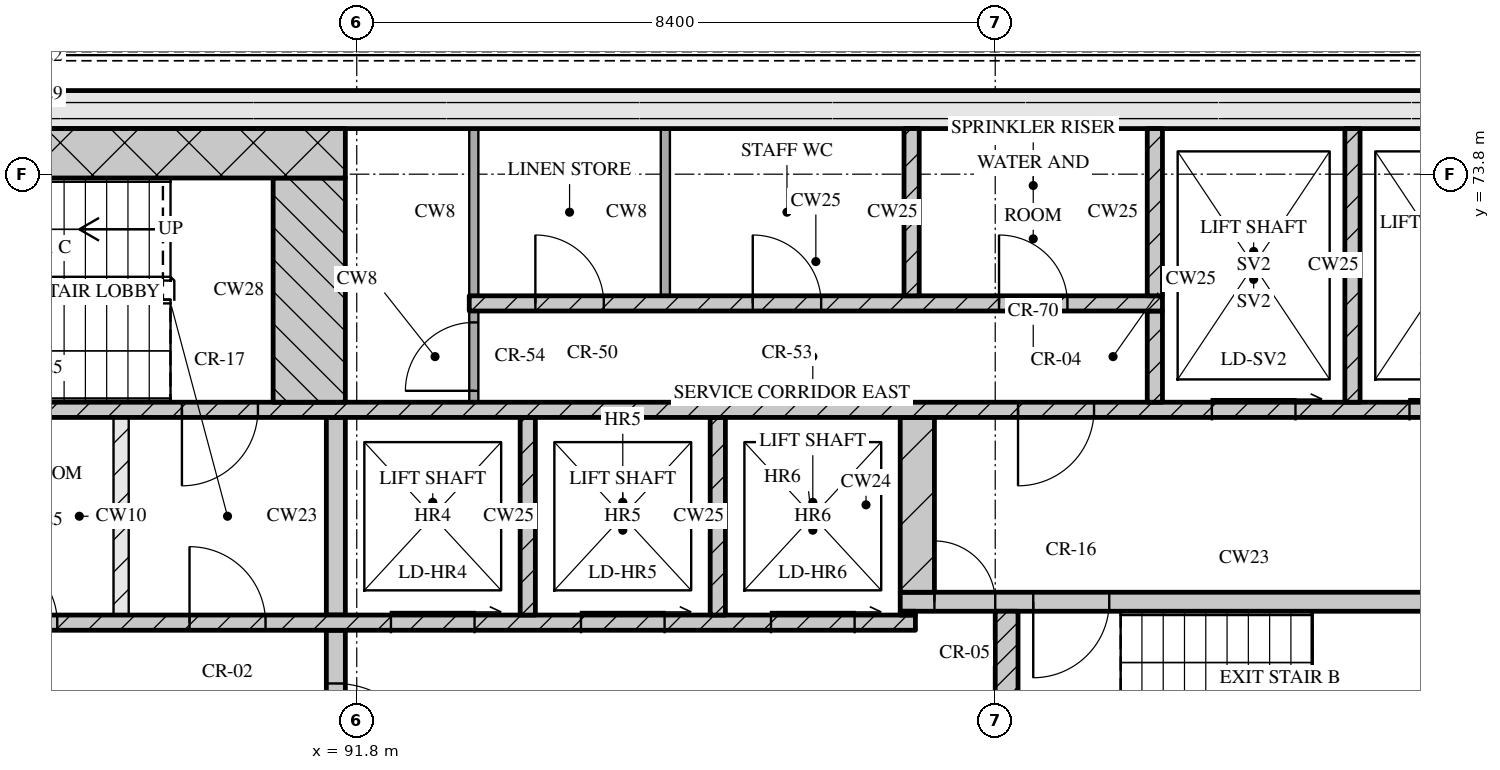
"""IFC4 building model, lengths in metres.
Left out: names, types, materials, properties, quantities, classifications, styles, units other than length and angle.
Written with IfcOpenShell. Run it as: python <this file> out.ifc"""

import sys

from ifc_helpers import new_model, si_unit, direction, frame, frame_2d, origin, place, context, subcontext, project, spatial, rectangle, extrude, element, fill, save


model = new_model("IFC4")
c1 = context("Model", 3, precision=1e-05, world=origin(), true_north=direction((0.0, 1.0)))
c2 = subcontext(c1, "Body", "Model", "MODEL_VIEW")
j1 = project(units=[si_unit("LENGTHUNIT", "METRE"), si_unit("PLANEANGLEUNIT", "RADIAN")], contexts=[c1])
p1 = place(None, origin())
s1 = spatial("IfcSite", under=j1, at=p1, CompositionType="ELEMENT")
p2 = place(p1, origin())
s2 = spatial("IfcBuilding", under=s1, at=p2, CompositionType="ELEMENT")
p3 = place(p2, frame((0.0, 0.0, 306.75)))
s3 = spatial("IfcBuildingStorey", under=s2, at=p3, CompositionType="ELEMENT", Elevation=306.75)
p4 = place(p3, frame((67.3, 74.65, 0.0), z_axis=(0.0, 0.0, 1.0), x_axis=(1.0, 0.0, 0.0)))
e1 = element("IfcWall", 1, at=p4, inside=s3, PredefinedType="SOLIDWALL", context=c2, shape_type="SweptSolid", body=[
    extrude(rectangle(XDim=40.6, YDim=0.5, at=frame_2d((20.3, 0.0))), origin(), (0.0, 0.0, 1.0), 3.3),
])
p5 = place(p3, frame((91.525, 65.2, 0.0), z_axis=(0.0, 0.0, 1.0), x_axis=(0.0, 1.0, 0.0)))
e2 = element("IfcWall", 2, at=p5, inside=s3, PredefinedType="SOLIDWALL", context=c2, shape_type="SweptSolid", body=[
    extrude(rectangle(XDim=2.6, YDim=0.25, at=frame_2d((1.3, 0.0))), origin(), (0.0, 0.0, 1.0), 3.3),
])
p6 = place(p5, frame((0.7, 0.0, 0.0)))
e3 = element("IfcOpeningElement", 3, at=p6, cuts=e2, PredefinedType="OPENING", context=c2, shape_type="SweptSolid", body=[
    extrude(rectangle(XDim=1.2, YDim=2.1, at=frame_2d((0.6, 1.05))), frame((0.0, 0.135, 0.0), z_axis=(0.0, -1.0, 0.0), x_axis=(1.0, 0.0, 0.0)), (0.0, 0.0, 1.0), 0.27),
])
p7 = place(p3, frame((100.35, 65.2, 0.0), z_axis=(0.0, 0.0, 1.0), x_axis=(0.0, 1.0, 0.0)))
e4 = element("IfcWall", 4, at=p7, inside=s3, PredefinedType="SOLIDWALL", context=c2, shape_type="SweptSolid", body=[
    extrude(rectangle(XDim=2.85, YDim=0.3, at=frame_2d((1.425, 0.0))), origin(), (0.0, 0.0, 1.0), 3.3),
])
p8 = place(p3, frame((76.05, 67.9, 0.0), z_axis=(0.0, 0.0, 1.0), x_axis=(1.0, 0.0, 0.0)))
e5 = element("IfcWall", 5, at=p8, inside=s3, PredefinedType="SOLIDWALL", context=c2, shape_type="SweptSolid", body=[
    extrude(rectangle(XDim=23.1, YDim=0.2, at=frame_2d((11.55, 0.0))), origin(), (0.0, 0.0, 1.0), 3.3),
])
p9 = place(p8, frame((1.4, 0.0, 0.0)))
e6 = element("IfcOpeningElement", 6, at=p9, cuts=e5, PredefinedType="OPENING", context=c2, shape_type="SweptSolid", body=[
    extrude(rectangle(XDim=0.9, YDim=2.1, at=frame_2d((0.45, 1.05))), frame((0.0, 0.11, 0.0), z_axis=(0.0, -1.0, 0.0), x_axis=(1.0, 0.0, 0.0)), (0.0, 0.0, 1.0), 0.22),
])
p10 = place(p8, frame((5.11, 0.0, 0.0)))
e7 = element("IfcOpeningElement", 7, at=p10, cuts=e5, PredefinedType="OPENING", context=c2, shape_type="SweptSolid", body=[
    extrude(rectangle(XDim=0.9, YDim=2.1, at=frame_2d((0.45, 1.05))), frame((0.0, 0.11, 0.0), z_axis=(0.0, -1.0, 0.0), x_axis=(1.0, 0.0, 0.0)), (0.0, 0.0, 1.0), 0.22),
])
p11 = place(p8, frame((8.45, 0.0, 0.0)))
e8 = element("IfcOpeningElement", 8, at=p11, cuts=e5, PredefinedType="OPENING", context=c2, shape_type="SweptSolid", body=[
    extrude(rectangle(XDim=0.9, YDim=2.1, at=frame_2d((0.45, 1.05))), frame((0.0, 0.11, 0.0), z_axis=(0.0, -1.0, 0.0), x_axis=(1.0, 0.0, 0.0)), (0.0, 0.0, 1.0), 0.22),
])
p12 = place(p8, frame((10.91, 0.0, 0.0)))
e9 = element("IfcOpeningElement", 9, at=p12, cuts=e5, PredefinedType="OPENING", context=c2, shape_type="SweptSolid", body=[
    extrude(rectangle(XDim=0.9, YDim=2.1, at=frame_2d((0.45, 1.05))), frame((0.0, 0.11, 0.0), z_axis=(0.0, -1.0, 0.0), x_axis=(1.0, 0.0, 0.0)), (0.0, 0.0, 1.0), 0.22),
])
p13 = place(p8, frame((13.55, 0.0, 0.0)))
e10 = element("IfcOpeningElement", 10, at=p13, cuts=e5, PredefinedType="OPENING", context=c2, shape_type="SweptSolid", body=[
    extrude(rectangle(XDim=1.0, YDim=2.1, at=frame_2d((0.5, 1.05))), frame((0.0, 0.11, 0.0), z_axis=(0.0, -1.0, 0.0), x_axis=(1.0, 0.0, 0.0)), (0.0, 0.0, 1.0), 0.22),
])
p14 = place(p8, frame((16.2, 0.0, 0.0)))
e11 = element("IfcOpeningElement", 11, at=p14, cuts=e5, PredefinedType="OPENING", context=c2, shape_type="SweptSolid", body=[
    extrude(rectangle(XDim=1.1, YDim=2.1, at=frame_2d((0.55, 1.05))), frame((0.0, 0.11, 0.0), z_axis=(0.0, -1.0, 0.0), x_axis=(1.0, 0.0, 0.0)), (0.0, 0.0, 1.0), 0.22),
])
p15 = place(p8, frame((18.7, 0.0, 0.0)))
e12 = element("IfcOpeningElement", 12, at=p15, cuts=e5, PredefinedType="OPENING", context=c2, shape_type="SweptSolid", body=[
    extrude(rectangle(XDim=1.1, YDim=2.1, at=frame_2d((0.55, 1.05))), frame((0.0, 0.11, 0.0), z_axis=(0.0, -1.0, 0.0), x_axis=(1.0, 0.0, 0.0)), (0.0, 0.0, 1.0), 0.22),
])
p16 = place(p8, frame((21.2, 0.0, 0.0)))
e13 = element("IfcOpeningElement", 13, at=p16, cuts=e5, PredefinedType="OPENING", context=c2, shape_type="SweptSolid", body=[
    extrude(rectangle(XDim=1.1, YDim=2.1, at=frame_2d((0.55, 1.05))), frame((0.0, 0.11, 0.0), z_axis=(0.0, -1.0, 0.0), x_axis=(1.0, 0.0, 0.0)), (0.0, 0.0, 1.0), 0.22),
])
p17 = place(p3, frame((88.7, 68.0, 0.0), z_axis=(0.0, 0.0, 1.0), x_axis=(0.0, 1.0, 0.0)))
e14 = element("IfcWall", 14, at=p17, inside=s3, PredefinedType="PARTITIONING", context=c2, shape_type="SweptSolid", body=[
    extrude(rectangle(XDim=2.6, YDim=0.2, at=frame_2d((1.3, 0.0))), origin(), (0.0, 0.0, 1.0), 3.3),
])
p18 = place(p3, frame((91.525, 68.0, 0.0), z_axis=(0.0, 0.0, 1.0), x_axis=(0.0, 1.0, 0.0)))
e15 = element("IfcWall", 15, at=p18, inside=s3, PredefinedType="SOLIDWALL", context=c2, shape_type="SweptSolid", body=[
    extrude(rectangle(XDim=2.6, YDim=0.25, at=frame_2d((1.3, 0.0))), origin(), (0.0, 0.0, 1.0), 3.3),
])
for number, where, z_axis, x_axis in (
    (16, (94.05, 68.0, 0.0), (0.0, 0.0, 1.0), (0.0, 1.0, 0.0)),
    (17, (96.55, 68.0, 0.0), (0.0, 0.0, 1.0), (0.0, 1.0, 0.0)),
):
    element("IfcWall", number, at=place(p3, frame(where, z_axis=z_axis, x_axis=x_axis)), inside=s3, PredefinedType="SOLIDWALL", context=c2, shape_type="SweptSolid", body=[
        extrude(rectangle(XDim=2.6, YDim=0.2, at=frame_2d((1.3, 0.0))), origin(), (0.0, 0.0, 1.0), 3.3),
    ])
p19 = place(p3, frame((98.95, 68.025, 0.0), z_axis=(0.0, 0.0, 1.0), x_axis=(1.0, 0.0, 0.0)))
e18 = element("IfcWall", 18, at=p19, inside=s3, PredefinedType="SOLIDWALL", context=c2, shape_type="SweptSolid", body=[
    extrude(rectangle(XDim=0.2, YDim=0.05, at=frame_2d((0.1, 0.0))), origin(), (0.0, 0.0, 1.0), 3.3),
])
p20 = place(p3, frame((98.95, 68.175, 0.0), z_axis=(0.0, 0.0, 1.0), x_axis=(1.0, 0.0, 0.0)))
e19 = element("IfcWall", 19, at=p20, inside=s3, PredefinedType="SOLIDWALL", context=c2, shape_type="SweptSolid", body=[
    extrude(rectangle(XDim=8.45, YDim=0.25, at=frame_2d((4.225, 0.0))), origin(), (0.0, 0.0, 1.0), 3.3),
])
p21 = place(p20, frame((0.45, 0.0, 0.0)))
e20 = element("IfcOpeningElement", 20, at=p21, cuts=e19, PredefinedType="OPENING", context=c2, shape_type="SweptSolid", body=[
    extrude(rectangle(XDim=0.8, YDim=2.1, at=frame_2d((0.4, 1.05))), frame((0.0, 0.135, 0.0), z_axis=(0.0, -1.0, 0.0), x_axis=(1.0, 0.0, 0.0)), (0.0, 0.0, 1.0), 0.27),
])
p22 = place(p20, frame((1.75, 0.0, 0.0)))
e21 = element("IfcOpeningElement", 21, at=p22, cuts=e19, PredefinedType="OPENING", context=c2, shape_type="SweptSolid", body=[
    extrude(rectangle(XDim=1.0, YDim=2.1, at=frame_2d((0.5, 1.05))), frame((0.0, 0.135, 0.0), z_axis=(0.0, -1.0, 0.0), x_axis=(1.0, 0.0, 0.0)), (0.0, 0.0, 1.0), 0.27),
])
p23 = place(p3, frame((99.175, 68.3, 0.0), z_axis=(0.0, 0.0, 1.0), x_axis=(0.0, 1.0, 0.0)))
e22 = element("IfcWall", 22, at=p23, inside=s3, PredefinedType="SOLIDWALL", context=c2, shape_type="SweptSolid", body=[
    extrude(rectangle(XDim=2.3, YDim=0.45, at=frame_2d((1.15, 0.0))), origin(), (0.0, 0.0, 1.0), 3.3),
])
p24 = place(p3, frame((67.8, 70.7, 0.0), z_axis=(0.0, 0.0, 1.0), x_axis=(1.0, 0.0, 0.0)))
e23 = element("IfcWall", 23, at=p24, inside=s3, PredefinedType="SOLIDWALL", context=c2, shape_type="SweptSolid", body=[
    extrude(rectangle(XDim=39.6, YDim=0.2, at=frame_2d((19.8, 0.0))), origin(), (0.0, 0.0, 1.0), 3.3),
])
p25 = place(p24, frame((0.65, 0.0, 0.0)))
e24 = element("IfcOpeningElement", 24, at=p25, cuts=e23, PredefinedType="OPENING", context=c2, shape_type="SweptSolid", body=[
    extrude(rectangle(XDim=1.1, YDim=2.1, at=frame_2d((0.55, 1.05))), frame((0.0, 0.11, 0.0), z_axis=(0.0, -1.0, 0.0), x_axis=(1.0, 0.0, 0.0)), (0.0, 0.0, 1.0), 0.22),
])
p26 = place(p24, frame((3.25, 0.0, 0.0)))
e25 = element("IfcOpeningElement", 25, at=p26, cuts=e23, PredefinedType="OPENING", context=c2, shape_type="SweptSolid", body=[
    extrude(rectangle(XDim=1.1, YDim=2.1, at=frame_2d((0.55, 1.05))), frame((0.0, 0.11, 0.0), z_axis=(0.0, -1.0, 0.0), x_axis=(1.0, 0.0, 0.0)), (0.0, 0.0, 1.0), 0.22),
])
p27 = place(p24, frame((5.9, 0.0, 0.0)))
e26 = element("IfcOpeningElement", 26, at=p27, cuts=e23, PredefinedType="OPENING", context=c2, shape_type="SweptSolid", body=[
    extrude(rectangle(XDim=1.0, YDim=2.1, at=frame_2d((0.5, 1.05))), frame((0.0, 0.11, 0.0), z_axis=(0.0, -1.0, 0.0), x_axis=(1.0, 0.0, 0.0)), (0.0, 0.0, 1.0), 0.22),
])
p28 = place(p24, frame((21.7, 0.0, 0.0)))
e27 = element("IfcOpeningElement", 27, at=p28, cuts=e23, PredefinedType="OPENING", context=c2, shape_type="SweptSolid", body=[
    extrude(rectangle(XDim=1.0, YDim=2.1, at=frame_2d((0.5, 1.05))), frame((0.0, 0.11, 0.0), z_axis=(0.0, -1.0, 0.0), x_axis=(1.0, 0.0, 0.0)), (0.0, 0.0, 1.0), 0.22),
])
p29 = place(p24, frame((32.7, 0.0, 0.0)))
e28 = element("IfcOpeningElement", 28, at=p29, cuts=e23, PredefinedType="OPENING", context=c2, shape_type="SweptSolid", body=[
    extrude(rectangle(XDim=1.0, YDim=2.1, at=frame_2d((0.5, 1.05))), frame((0.0, 0.11, 0.0), z_axis=(0.0, -1.0, 0.0), x_axis=(1.0, 0.0, 0.0)), (0.0, 0.0, 1.0), 0.22),
])
p30 = place(p24, frame((35.25, 0.0, 0.0)))
e29 = element("IfcOpeningElement", 29, at=p30, cuts=e23, PredefinedType="OPENING", context=c2, shape_type="SweptSolid", body=[
    extrude(rectangle(XDim=1.1, YDim=2.1, at=frame_2d((0.55, 1.05))), frame((0.0, 0.11, 0.0), z_axis=(0.0, -1.0, 0.0), x_axis=(1.0, 0.0, 0.0)), (0.0, 0.0, 1.0), 0.22),
])
p31 = place(p24, frame((37.85, 0.0, 0.0)))
e30 = element("IfcOpeningElement", 30, at=p31, cuts=e23, PredefinedType="OPENING", context=c2, shape_type="SweptSolid", body=[
    extrude(rectangle(XDim=1.1, YDim=2.1, at=frame_2d((0.55, 1.05))), frame((0.0, 0.11, 0.0), z_axis=(0.0, -1.0, 0.0), x_axis=(1.0, 0.0, 0.0)), (0.0, 0.0, 1.0), 0.22),
])
p32 = place(p3, frame((91.175, 70.8, 0.0), z_axis=(0.0, 0.0, 1.0), x_axis=(0.0, 1.0, 0.0)))
e31 = element("IfcWall", 31, at=p32, inside=s3, PredefinedType="SOLIDWALL", context=c2, shape_type="SweptSolid", body=[
    extrude(rectangle(XDim=2.95, YDim=0.95, at=frame_2d((1.475, 0.0))), origin(), (0.0, 0.0, 1.0), 3.3),
])
p33 = place(p3, frame((93.34, 70.8, 0.0), z_axis=(0.0, 0.0, 1.0), x_axis=(0.0, 1.0, 0.0)))
e32 = element("IfcWall", 32, at=p33, inside=s3, PredefinedType="PARTITIONING", context=c2, shape_type="SweptSolid", body=[
    extrude(rectangle(XDim=1.2, YDim=0.12, at=frame_2d((0.6, 0.0))), origin(), (0.0, 0.0, 1.0), 3.3),
])
p34 = place(p33, frame((0.15, 0.0, 0.0)))
e33 = element("IfcOpeningElement", 33, at=p34, cuts=e32, PredefinedType="OPENING", context=c2, shape_type="SweptSolid", body=[
    extrude(rectangle(XDim=0.9, YDim=2.1, at=frame_2d((0.45, 1.05))), frame((0.0, 0.07, 0.0), z_axis=(0.0, -1.0, 0.0), x_axis=(1.0, 0.0, 0.0)), (0.0, 0.0, 1.0), 0.14),
])
p35 = place(p3, frame((102.3, 70.8, 0.0), z_axis=(0.0, 0.0, 1.0), x_axis=(0.0, 1.0, 0.0)))
e34 = element("IfcWall", 34, at=p35, inside=s3, PredefinedType="SOLIDWALL", context=c2, shape_type="SweptSolid", body=[
    extrude(rectangle(XDim=1.2, YDim=0.2, at=frame_2d((0.6, 0.0))), origin(), (0.0, 0.0, 1.0), 3.3),
])
p36 = place(p3, frame((104.9, 70.8, 0.0), z_axis=(0.0, 0.0, 1.0), x_axis=(0.0, 1.0, 0.0)))
e35 = element("IfcWall", 35, at=p36, inside=s3, PredefinedType="SOLIDWALL", context=c2, shape_type="SweptSolid", body=[
    extrude(rectangle(XDim=3.6, YDim=0.2, at=frame_2d((1.8, 0.0))), origin(), (0.0, 0.0, 1.0), 3.3),
])
p37 = place(p3, frame((93.28, 72.1, 0.0), z_axis=(0.0, 0.0, 1.0), x_axis=(1.0, 0.0, 0.0)))
e36 = element("IfcWall", 36, at=p37, inside=s3, PredefinedType="SOLIDWALL", context=c2, shape_type="SweptSolid", body=[
    extrude(rectangle(XDim=9.12, YDim=0.2, at=frame_2d((4.56, 0.0))), origin(), (0.0, 0.0, 1.0), 3.3),
])
p38 = place(p37, frame((0.87, 0.0, 0.0)))
e37 = element("IfcOpeningElement", 37, at=p38, cuts=e36, PredefinedType="OPENING", context=c2, shape_type="SweptSolid", body=[
    extrude(rectangle(XDim=0.9, YDim=2.1, at=frame_2d((0.45, 1.05))), frame((0.0, 0.11, 0.0), z_axis=(0.0, -1.0, 0.0), x_axis=(1.0, 0.0, 0.0)), (0.0, 0.0, 1.0), 0.22),
])
p39 = place(p37, frame((3.73, 0.0, 0.0)))
e38 = element("IfcOpeningElement", 38, at=p39, cuts=e36, PredefinedType="OPENING", context=c2, shape_type="SweptSolid", body=[
    extrude(rectangle(XDim=0.9, YDim=2.1, at=frame_2d((0.45, 1.05))), frame((0.0, 0.11, 0.0), z_axis=(0.0, -1.0, 0.0), x_axis=(1.0, 0.0, 0.0)), (0.0, 0.0, 1.0), 0.22),
])
p40 = place(p37, frame((6.97, 0.0, 0.0)))
e39 = element("IfcOpeningElement", 39, at=p40, cuts=e36, PredefinedType="OPENING", context=c2, shape_type="SweptSolid", body=[
    extrude(rectangle(XDim=0.9, YDim=2.1, at=frame_2d((0.45, 1.05))), frame((0.0, 0.11, 0.0), z_axis=(0.0, -1.0, 0.0), x_axis=(1.0, 0.0, 0.0)), (0.0, 0.0, 1.0), 0.22),
])
for number, where, z_axis, x_axis in (
    (40, (93.34, 72.2, 0.0), (0.0, 0.0, 1.0), (0.0, 1.0, 0.0)),
    (41, (95.86, 72.2, 0.0), (0.0, 0.0, 1.0), (0.0, 1.0, 0.0)),
):
    element("IfcWall", number, at=place(p3, frame(where, z_axis=z_axis, x_axis=x_axis)), inside=s3, PredefinedType="PARTITIONING", context=c2, shape_type="SweptSolid", body=[
        extrude(rectangle(XDim=2.2, YDim=0.12, at=frame_2d((1.1, 0.0))), origin(), (0.0, 0.0, 1.0), 3.3),
    ])
for number, where, z_axis, x_axis in (
    (42, (99.1, 72.2, 0.0), (0.0, 0.0, 1.0), (0.0, 1.0, 0.0)),
    (43, (102.3, 72.2, 0.0), (0.0, 0.0, 1.0), (0.0, 1.0, 0.0)),
):
    element("IfcWall", number, at=place(p3, frame(where, z_axis=z_axis, x_axis=x_axis)), inside=s3, PredefinedType="SOLIDWALL", context=c2, shape_type="SweptSolid", body=[
        extrude(rectangle(XDim=2.2, YDim=0.2, at=frame_2d((1.1, 0.0))), origin(), (0.0, 0.0, 1.0), 3.3),
    ])
p41 = place(p3, frame((83.55, 74.075, 0.0), z_axis=(0.0, 0.0, 1.0), x_axis=(1.0, 0.0, 0.0)))
e44 = element("IfcWall", 44, at=p41, inside=s3, PredefinedType="SOLIDWALL", context=c2, shape_type="SweptSolid", body=[
    extrude(rectangle(XDim=8.1, YDim=0.65, at=frame_2d((4.05, 0.0))), origin(), (0.0, 0.0, 1.0), 3.3),
])
p42 = place(p6, origin())
e45 = element("IfcDoor", 45, at=p42, inside=s3, OperationType="SINGLE_SWING_RIGHT", PredefinedType="DOOR", context=c2, shape_type="SweptSolid", body=[
    extrude(rectangle(XDim=1.2, YDim=2.1, at=frame_2d((0.6, 1.05))), frame((0.0, 0.025, 0.0), z_axis=(0.0, -1.0, 0.0), x_axis=(1.0, 0.0, 0.0)), (0.0, 0.0, 1.0), 0.05),
])
fill(e3, e45)
p43 = place(p12, origin())
e46 = element("IfcDoor", 46, at=p43, inside=s3, OperationType="SINGLE_SWING_LEFT", PredefinedType="DOOR", context=c2, shape_type="SweptSolid", body=[
    extrude(rectangle(XDim=0.9, YDim=2.1, at=frame_2d((0.45, 1.05))), frame((0.0, 0.025, 0.0), z_axis=(0.0, -1.0, 0.0), x_axis=(1.0, 0.0, 0.0)), (0.0, 0.0, 1.0), 0.05),
])
fill(e9, e46)
p44 = place(p13, origin())
e47 = element("IfcDoor", 47, at=p44, inside=s3, OperationType="SINGLE_SWING_LEFT", PredefinedType="DOOR", context=c2, shape_type="SweptSolid", body=[
    extrude(rectangle(XDim=1.0, YDim=2.1, at=frame_2d((0.5, 1.05))), frame((0.0, 0.025, 0.0), z_axis=(0.0, -1.0, 0.0), x_axis=(1.0, 0.0, 0.0)), (0.0, 0.0, 1.0), 0.05),
])
fill(e10, e47)
p45 = place(p14, origin())
e48 = element("IfcDoor", 48, at=p45, inside=s3, OperationType="SLIDING_TO_RIGHT", PredefinedType="DOOR", context=c2, shape_type="SweptSolid", body=[
    extrude(rectangle(XDim=1.1, YDim=2.1, at=frame_2d((0.55, 1.05))), frame((0.0, 0.025, 0.0), z_axis=(0.0, -1.0, 0.0), x_axis=(1.0, 0.0, 0.0)), (0.0, 0.0, 1.0), 0.05),
])
fill(e11, e48)
p46 = place(p15, origin())
e49 = element("IfcDoor", 49, at=p46, inside=s3, OperationType="SLIDING_TO_RIGHT", PredefinedType="DOOR", context=c2, shape_type="SweptSolid", body=[
    extrude(rectangle(XDim=1.1, YDim=2.1, at=frame_2d((0.55, 1.05))), frame((0.0, 0.025, 0.0), z_axis=(0.0, -1.0, 0.0), x_axis=(1.0, 0.0, 0.0)), (0.0, 0.0, 1.0), 0.05),
])
fill(e12, e49)
p47 = place(p16, origin())
e50 = element("IfcDoor", 50, at=p47, inside=s3, OperationType="SLIDING_TO_RIGHT", PredefinedType="DOOR", context=c2, shape_type="SweptSolid", body=[
    extrude(rectangle(XDim=1.1, YDim=2.1, at=frame_2d((0.55, 1.05))), frame((0.0, 0.025, 0.0), z_axis=(0.0, -1.0, 0.0), x_axis=(1.0, 0.0, 0.0)), (0.0, 0.0, 1.0), 0.05),
])
fill(e13, e50)
p48 = place(p21, origin())
e51 = element("IfcDoor", 51, at=p48, inside=s3, OperationType="SINGLE_SWING_LEFT", PredefinedType="DOOR", context=c2, shape_type="SweptSolid", body=[
    extrude(rectangle(XDim=0.8, YDim=2.1, at=frame_2d((0.4, 1.05))), frame((0.0, 0.025, 0.0), z_axis=(0.0, -1.0, 0.0), x_axis=(1.0, 0.0, 0.0)), (0.0, 0.0, 1.0), 0.05),
])
fill(e20, e51)
p49 = place(p22, origin())
e52 = element("IfcDoor", 52, at=p49, inside=s3, OperationType="SINGLE_SWING_RIGHT", PredefinedType="DOOR", context=c2, shape_type="SweptSolid", body=[
    extrude(rectangle(XDim=1.0, YDim=2.1, at=frame_2d((0.5, 1.05))), frame((0.0, 0.025, 0.0), z_axis=(0.0, -1.0, 0.0), x_axis=(1.0, 0.0, 0.0)), (0.0, 0.0, 1.0), 0.05),
])
fill(e21, e52)
p50 = place(p28, origin())
e53 = element("IfcDoor", 53, at=p50, inside=s3, OperationType="SINGLE_SWING_RIGHT", PredefinedType="DOOR", context=c2, shape_type="SweptSolid", body=[
    extrude(rectangle(XDim=1.0, YDim=2.1, at=frame_2d((0.5, 1.05))), frame((0.0, 0.025, 0.0), z_axis=(0.0, -1.0, 0.0), x_axis=(1.0, 0.0, 0.0)), (0.0, 0.0, 1.0), 0.05),
])
fill(e27, e53)
p51 = place(p29, origin())
e54 = element("IfcDoor", 54, at=p51, inside=s3, OperationType="SINGLE_SWING_RIGHT", PredefinedType="DOOR", context=c2, shape_type="SweptSolid", body=[
    extrude(rectangle(XDim=1.0, YDim=2.1, at=frame_2d((0.5, 1.05))), frame((0.0, 0.025, 0.0), z_axis=(0.0, -1.0, 0.0), x_axis=(1.0, 0.0, 0.0)), (0.0, 0.0, 1.0), 0.05),
])
fill(e28, e54)
p52 = place(p30, origin())
e55 = element("IfcDoor", 55, at=p52, inside=s3, OperationType="SLIDING_TO_RIGHT", PredefinedType="DOOR", context=c2, shape_type="SweptSolid", body=[
    extrude(rectangle(XDim=1.1, YDim=2.1, at=frame_2d((0.55, 1.05))), frame((0.0, 0.025, 0.0), z_axis=(0.0, -1.0, 0.0), x_axis=(1.0, 0.0, 0.0)), (0.0, 0.0, 1.0), 0.05),
])
fill(e29, e55)
p53 = place(p31, origin())
e56 = element("IfcDoor", 56, at=p53, inside=s3, OperationType="SLIDING_TO_RIGHT", PredefinedType="DOOR", context=c2, shape_type="SweptSolid", body=[
    extrude(rectangle(XDim=1.1, YDim=2.1, at=frame_2d((0.55, 1.05))), frame((0.0, 0.025, 0.0), z_axis=(0.0, -1.0, 0.0), x_axis=(1.0, 0.0, 0.0)), (0.0, 0.0, 1.0), 0.05),
])
fill(e30, e56)
p54 = place(p34, origin())
e57 = element("IfcDoor", 57, at=p54, inside=s3, OperationType="SINGLE_SWING_LEFT", PredefinedType="DOOR", context=c2, shape_type="SweptSolid", body=[
    extrude(rectangle(XDim=0.9, YDim=2.1, at=frame_2d((0.45, 1.05))), frame((0.0, 0.025, 0.0), z_axis=(0.0, -1.0, 0.0), x_axis=(1.0, 0.0, 0.0)), (0.0, 0.0, 1.0), 0.05),
])
fill(e33, e57)
p55 = place(p38, origin())
e58 = element("IfcDoor", 58, at=p55, inside=s3, OperationType="SINGLE_SWING_LEFT", PredefinedType="DOOR", context=c2, shape_type="SweptSolid", body=[
    extrude(rectangle(XDim=0.9, YDim=2.1, at=frame_2d((0.45, 1.05))), frame((0.0, 0.025, 0.0), z_axis=(0.0, -1.0, 0.0), x_axis=(1.0, 0.0, 0.0)), (0.0, 0.0, 1.0), 0.05),
])
fill(e37, e58)
p56 = place(p39, origin())
e59 = element("IfcDoor", 59, at=p56, inside=s3, OperationType="SINGLE_SWING_LEFT", PredefinedType="DOOR", context=c2, shape_type="SweptSolid", body=[
    extrude(rectangle(XDim=0.9, YDim=2.1, at=frame_2d((0.45, 1.05))), frame((0.0, 0.025, 0.0), z_axis=(0.0, -1.0, 0.0), x_axis=(1.0, 0.0, 0.0)), (0.0, 0.0, 1.0), 0.05),
])
fill(e38, e59)
p57 = place(p40, origin())
e60 = element("IfcDoor", 60, at=p57, inside=s3, OperationType="SINGLE_SWING_LEFT", PredefinedType="DOOR", context=c2, shape_type="SweptSolid", body=[
    extrude(rectangle(XDim=0.9, YDim=2.1, at=frame_2d((0.45, 1.05))), frame((0.0, 0.025, 0.0), z_axis=(0.0, -1.0, 0.0), x_axis=(1.0, 0.0, 0.0)), (0.0, 0.0, 1.0), 0.05),
])
fill(e39, e60)
save(model, sys.argv[1])
